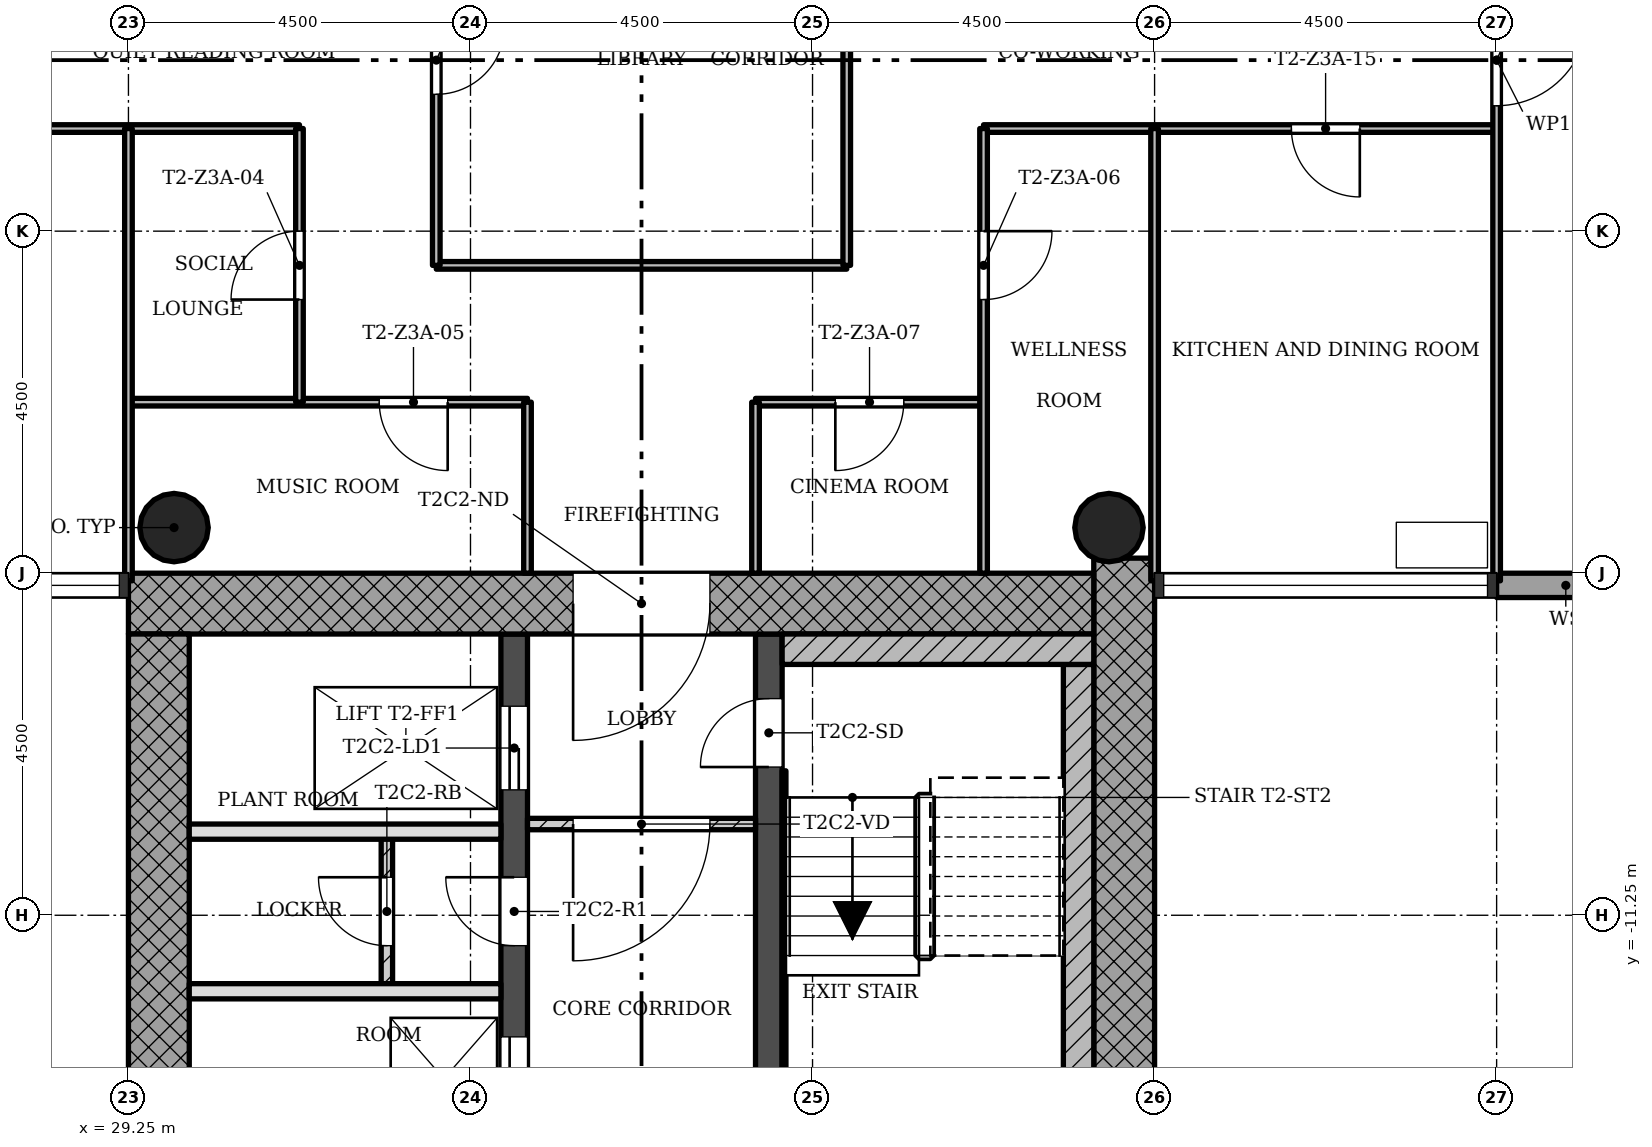
"""IFC4 building model, lengths in metres.
Left out: names, types, materials, properties, quantities, classifications, styles, units other than length and angle.
Written with IfcOpenShell. Run it as: python <this file> out.ifc"""

import sys

from ifc_helpers import new_model, si_unit, direction, frame, frame_2d, origin, origin_2d, place, context, subcontext, project, spatial, rectangle, hollow_circle, extrude, element, fill, save


model = new_model("IFC4")
c1 = context("Model", 3, precision=1e-05, world=origin(), true_north=direction((0.0, 1.0)))
c2 = subcontext(c1, "Body", "Model", "MODEL_VIEW")
j1 = project(units=[si_unit("LENGTHUNIT", "METRE"), si_unit("PLANEANGLEUNIT", "RADIAN")], contexts=[c1])
p1 = place(None, origin())
s1 = spatial("IfcSite", under=j1, at=p1, CompositionType="ELEMENT")
p2 = place(p1, origin())
s2 = spatial("IfcBuilding", under=s1, at=p2, CompositionType="ELEMENT")
p3 = place(p2, frame((0.0, 0.0, 140.5)))
s3 = spatial("IfcBuildingStorey", under=s2, at=p3, CompositionType="ELEMENT", Elevation=140.5)
p4 = place(p3, frame((42.35, -14.95, 0.0), z_axis=(0.0, 0.0, 1.0), x_axis=(0.0, 1.0, 0.0)))
e1 = element("IfcWall", 1, at=p4, inside=s3, PredefinedType="SHEAR", context=c2, shape_type="SweptSolid", body=[
    extrude(rectangle(XDim=8.398, YDim=0.8, at=frame_2d((4.199, 0.0))), origin(), (0.0, 0.0, 1.0), 3.4),
])
p5 = place(p3, frame((41.95, -7.15, 0.0), z_axis=(0.0, 0.0, 1.0), x_axis=(-1.0, 0.0, 0.0)))
e2 = element("IfcWall", 2, at=p5, inside=s3, PredefinedType="SHEAR", context=c2, shape_type="SweptSolid", body=[
    extrude(rectangle(XDim=12.7, YDim=0.8, at=frame_2d((6.35, 0.0))), origin(), (0.0, 0.0, 1.0), 3.4),
])
p6 = place(p5, frame((5.05, 0.0, 0.0)))
e3 = element("IfcOpeningElement", 3, at=p6, cuts=e2, PredefinedType="OPENING", context=c2, shape_type="SweptSolid", body=[
    extrude(rectangle(XDim=1.8, YDim=2.1, at=frame_2d((0.9, 1.05))), frame((0.0, 0.41, 0.0), z_axis=(0.0, -1.0, 0.0), x_axis=(1.0, 0.0, 0.0)), (0.0, 0.0, 1.0), 0.82),
])
p7 = place(p3, frame((29.65, -7.55, 0.0), z_axis=(0.0, 0.0, 1.0), x_axis=(0.0, -1.0, 0.0)))
e4 = element("IfcWall", 4, at=p7, inside=s3, PredefinedType="SHEAR", context=c2, shape_type="SweptSolid", body=[
    extrude(rectangle(XDim=8.2, YDim=0.8, at=frame_2d((4.1, 0.0))), origin(), (0.0, 0.0, 1.0), 3.4),
])
p8 = place(p3, frame((34.325, -14.95, 0.0), z_axis=(0.0, 0.0, 1.0), x_axis=(0.0, 1.0, 0.0)))
e5 = element("IfcWall", 5, at=p8, inside=s3, PredefinedType="SHEAR", context=c2, shape_type="SweptSolid", body=[
    extrude(rectangle(XDim=7.4, YDim=0.35, at=frame_2d((3.7, 0.0))), origin(), (0.0, 0.0, 1.0), 3.4),
])
p9 = place(p8, frame((5.35, 0.0, 0.0)))
e6 = element("IfcOpeningElement", 6, at=p9, cuts=e5, PredefinedType="OPENING", context=c2, shape_type="SweptSolid", body=[
    extrude(rectangle(XDim=1.1, YDim=2.1, at=frame_2d((0.55, 1.05))), frame((0.0, 0.185, 0.0), z_axis=(0.0, -1.0, 0.0), x_axis=(1.0, 0.0, 0.0)), (0.0, 0.0, 1.0), 0.37),
])
p10 = place(p8, frame((1.0, 0.0, 0.0)))
e7 = element("IfcOpeningElement", 7, at=p10, cuts=e5, PredefinedType="OPENING", context=c2, shape_type="SweptSolid", body=[
    extrude(rectangle(XDim=1.1, YDim=2.1, at=frame_2d((0.55, 1.05))), frame((0.0, 0.185, 0.0), z_axis=(0.0, -1.0, 0.0), x_axis=(1.0, 0.0, 0.0)), (0.0, 0.0, 1.0), 0.37),
])
p11 = place(p8, frame((3.3, 0.0, 0.0)))
e8 = element("IfcOpeningElement", 8, at=p11, cuts=e5, PredefinedType="OPENING", context=c2, shape_type="SweptSolid", body=[
    extrude(rectangle(XDim=0.9, YDim=2.1, at=frame_2d((0.45, 1.05))), frame((0.0, 0.185, 0.0), z_axis=(0.0, -1.0, 0.0), x_axis=(1.0, 0.0, 0.0)), (0.0, 0.0, 1.0), 0.37),
])
p12 = place(p3, frame((37.675, -14.95, 0.0), z_axis=(0.0, 0.0, 1.0), x_axis=(0.0, 1.0, 0.0)))
e9 = element("IfcWall", 9, at=p12, inside=s3, PredefinedType="SHEAR", context=c2, shape_type="SweptSolid", body=[
    extrude(rectangle(XDim=7.4, YDim=0.35, at=frame_2d((3.7, 0.0))), origin(), (0.0, 0.0, 1.0), 3.4),
])
p13 = place(p12, frame((5.65, 0.0, 0.0)))
e10 = element("IfcOpeningElement", 10, at=p13, cuts=e9, PredefinedType="OPENING", context=c2, shape_type="SweptSolid", body=[
    extrude(rectangle(XDim=0.9, YDim=2.1, at=frame_2d((0.45, 1.05))), frame((0.0, 0.185, 0.0), z_axis=(0.0, -1.0, 0.0), x_axis=(1.0, 0.0, 0.0)), (0.0, 0.0, 1.0), 0.37),
])
for number, where, z_axis, x_axis in (
    (11, (42.15, -6.15, 0.0), (0.0, 0.0, 1.0), (1.0, 0.0, 0.0)),
    (12, (29.85, -6.15, 0.0), (0.0, 0.0, 1.0), (1.0, 0.0, 0.0)),
):
    element("IfcColumn", number, at=place(p3, frame(where, z_axis=z_axis, x_axis=x_axis)), inside=s3, PredefinedType="COLUMN", context=c2, shape_type="SweptSolid", body=[
        extrude(hollow_circle(Radius=0.45, WallThickness=0.032, at=origin_2d()), origin(), (0.0, 0.0, 1.0), 3.4),
    ])
p14 = place(p3, frame((47.25, -6.91, -0.3), z_axis=(0.0, 0.0, 1.0), x_axis=(1.0, 0.0, 0.0)))
e13 = element("IfcWall", 13, at=p14, inside=s3, PredefinedType="STANDARD", context=c2, shape_type="SweptSolid", body=[
    extrude(rectangle(XDim=1.82, YDim=0.32, at=frame_2d((0.91, 0.0))), origin(), (0.0, 0.0, 1.0), 3.4),
])
p15 = place(p3, frame((34.5, -10.05, 0.0), z_axis=(0.0, 0.0, 1.0), x_axis=(1.0, 0.0, 0.0)))
e14 = element("IfcWall", 14, at=p15, inside=s3, PredefinedType="PARTITIONING", context=c2, shape_type="SweptSolid", body=[
    extrude(rectangle(XDim=3.0, YDim=0.15, at=frame_2d((1.5, 0.0))), origin(), (0.0, 0.0, 1.0), 3.0),
])
p16 = place(p15, frame((0.6, 0.0, 0.0)))
e15 = element("IfcOpeningElement", 15, at=p16, cuts=e14, PredefinedType="OPENING", context=c2, shape_type="SweptSolid", body=[
    extrude(rectangle(XDim=1.8, YDim=2.1, at=frame_2d((0.9, 1.05))), frame((0.0, 0.085, 0.0), z_axis=(0.0, -1.0, 0.0), x_axis=(1.0, 0.0, 0.0)), (0.0, 0.0, 1.0), 0.17),
])
for number, where, z_axis, x_axis in (
    (16, (30.05, -12.25, 0.0), (0.0, 0.0, 1.0), (1.0, 0.0, 0.0)),
    (17, (30.05, -10.15, 0.0), (0.0, 0.0, 1.0), (1.0, 0.0, 0.0)),
):
    element("IfcWall", number, at=place(p3, frame(where, z_axis=z_axis, x_axis=x_axis)), inside=s3, PredefinedType="SOLIDWALL", context=c2, shape_type="SweptSolid", body=[
        extrude(rectangle(XDim=4.1, YDim=0.2, at=frame_2d((2.05, 0.0))), origin(), (0.0, 0.0, 1.0), 3.0),
    ])
p17 = place(p3, frame((32.65, -10.15, 0.0), z_axis=(0.0, 0.0, 1.0), x_axis=(0.0, -1.0, 0.0)))
e18 = element("IfcWall", 18, at=p17, inside=s3, PredefinedType="PARTITIONING", context=c2, shape_type="SweptSolid", body=[
    extrude(rectangle(XDim=2.1, YDim=0.15, at=frame_2d((1.05, 0.0))), origin(), (0.0, 0.0, 1.0), 3.0),
])
p18 = place(p17, frame((0.6, 0.0, 0.0)))
e19 = element("IfcOpeningElement", 19, at=p18, cuts=e18, PredefinedType="OPENING", context=c2, shape_type="SweptSolid", body=[
    extrude(rectangle(XDim=0.9, YDim=2.1, at=frame_2d((0.45, 1.05))), frame((0.0, 0.085, 0.0), z_axis=(0.0, -1.0, 0.0), x_axis=(1.0, 0.0, 0.0)), (0.0, 0.0, 1.0), 0.17),
])
p19 = place(p3, frame((40.5, -4.5, 0.0), z_axis=(0.0, 0.0, 1.0), x_axis=(-1.0, 0.0, 0.0)))
e20 = element("IfcWall", 20, at=p19, inside=s3, PredefinedType="PARTITIONING", context=c2, shape_type="SweptSolid", body=[
    extrude(rectangle(XDim=3.0, YDim=0.1, at=frame_2d((1.5, 0.0))), origin(), (0.0, 0.0, 1.0), 3.0),
])
p20 = place(p19, frame((1.05, 0.0, 0.0)))
e21 = element("IfcOpeningElement", 21, at=p20, cuts=e20, PredefinedType="OPENING", context=c2, shape_type="SweptSolid", body=[
    extrude(rectangle(XDim=0.9, YDim=2.1, at=frame_2d((0.45, 1.05))), frame((0.0, 0.06, 0.0), z_axis=(0.0, -1.0, 0.0), x_axis=(1.0, 0.0, 0.0)), (0.0, 0.0, 1.0), 0.12),
])
p21 = place(p3, frame((34.5, -4.5, 0.0), z_axis=(0.0, 0.0, 1.0), x_axis=(-1.0, 0.0, 0.0)))
e22 = element("IfcWall", 22, at=p21, inside=s3, PredefinedType="PARTITIONING", context=c2, shape_type="SweptSolid", body=[
    extrude(rectangle(XDim=5.25, YDim=0.1, at=frame_2d((2.625, 0.0))), origin(), (0.0, 0.0, 1.0), 3.0),
])
p22 = place(p21, frame((1.05, 0.0, 0.0)))
e23 = element("IfcOpeningElement", 23, at=p22, cuts=e22, PredefinedType="OPENING", context=c2, shape_type="SweptSolid", body=[
    extrude(rectangle(XDim=0.9, YDim=2.1, at=frame_2d((0.45, 1.05))), frame((0.0, 0.06, 0.0), z_axis=(0.0, -1.0, 0.0), x_axis=(1.0, 0.0, 0.0)), (0.0, 0.0, 1.0), 0.12),
])
p23 = place(p3, frame((38.7, -2.7, 0.0), z_axis=(0.0, 0.0, 1.0), x_axis=(-1.0, 0.0, 0.0)))
e24 = element("IfcWall", 24, at=p23, inside=s3, PredefinedType="PARTITIONING", context=c2, shape_type="SweptSolid", body=[
    extrude(rectangle(XDim=5.4, YDim=0.1, at=frame_2d((2.7, 0.0))), origin(), (0.0, 0.0, 1.0), 3.0),
])
p24 = place(p3, frame((47.25, -0.9, 0.0), z_axis=(0.0, 0.0, 1.0), x_axis=(-1.0, 0.0, 0.0)))
e25 = element("IfcWall", 25, at=p24, inside=s3, PredefinedType="PARTITIONING", context=c2, shape_type="SweptSolid", body=[
    extrude(rectangle(XDim=6.75, YDim=0.1, at=frame_2d((3.375, 0.0))), origin(), (0.0, 0.0, 1.0), 3.0),
])
p25 = place(p24, frame((1.8, 0.0, 0.0)))
e26 = element("IfcOpeningElement", 26, at=p25, cuts=e25, PredefinedType="OPENING", context=c2, shape_type="SweptSolid", body=[
    extrude(rectangle(XDim=0.9, YDim=2.1, at=frame_2d((0.45, 1.05))), frame((0.0, 0.06, 0.0), z_axis=(0.0, -1.0, 0.0), x_axis=(1.0, 0.0, 0.0)), (0.0, 0.0, 1.0), 0.12),
])
p26 = place(p3, frame((31.5, -0.9, 0.0), z_axis=(0.0, 0.0, 1.0), x_axis=(-1.0, 0.0, 0.0)))
e27 = element("IfcWall", 27, at=p26, inside=s3, PredefinedType="PARTITIONING", context=c2, shape_type="SweptSolid", body=[
    extrude(rectangle(XDim=4.05, YDim=0.1, at=frame_2d((2.025, 0.0))), origin(), (0.0, 0.0, 1.0), 3.0),
])
p27 = place(p3, frame((47.25, -6.85, 0.0), z_axis=(0.0, 0.0, 1.0), x_axis=(0.0, 1.0, 0.0)))
e28 = element("IfcWall", 28, at=p27, inside=s3, PredefinedType="PARTITIONING", context=c2, shape_type="SweptSolid", body=[
    extrude(rectangle(XDim=13.7, YDim=0.1, at=frame_2d((6.85, 0.0))), origin(), (0.0, 0.0, 1.0), 3.0),
])
p28 = place(p27, frame((6.25, 0.0, 0.0)))
e29 = element("IfcOpeningElement", 29, at=p28, cuts=e28, PredefinedType="OPENING", context=c2, shape_type="SweptSolid", body=[
    extrude(rectangle(XDim=1.2, YDim=2.1, at=frame_2d((0.6, 1.05))), frame((0.0, 0.06, 0.0), z_axis=(0.0, -1.0, 0.0), x_axis=(1.0, 0.0, 0.0)), (0.0, 0.0, 1.0), 0.12),
])
p29 = place(p3, frame((42.75, -6.85, 0.0), z_axis=(0.0, 0.0, 1.0), x_axis=(0.0, 1.0, 0.0)))
e30 = element("IfcWall", 30, at=p29, inside=s3, PredefinedType="PARTITIONING", context=c2, shape_type="SweptSolid", body=[
    extrude(rectangle(XDim=5.95, YDim=0.1, at=frame_2d((2.975, 0.0))), origin(), (0.0, 0.0, 1.0), 3.0),
])
p30 = place(p3, frame((40.5, -6.75, 0.0), z_axis=(0.0, 0.0, 1.0), x_axis=(0.0, 1.0, 0.0)))
e31 = element("IfcWall", 31, at=p30, inside=s3, PredefinedType="PARTITIONING", context=c2, shape_type="SweptSolid", body=[
    extrude(rectangle(XDim=5.85, YDim=0.1, at=frame_2d((2.925, 0.0))), origin(), (0.0, 0.0, 1.0), 3.0),
])
p31 = place(p30, frame((3.6, 0.0, 0.0)))
e32 = element("IfcOpeningElement", 32, at=p31, cuts=e31, PredefinedType="OPENING", context=c2, shape_type="SweptSolid", body=[
    extrude(rectangle(XDim=0.9, YDim=2.1, at=frame_2d((0.45, 1.05))), frame((0.0, 0.06, 0.0), z_axis=(0.0, -1.0, 0.0), x_axis=(1.0, 0.0, 0.0)), (0.0, 0.0, 1.0), 0.12),
])
p32 = place(p3, frame((38.7, -2.7, 0.0), z_axis=(0.0, 0.0, 1.0), x_axis=(0.0, 1.0, 0.0)))
e33 = element("IfcWall", 33, at=p32, inside=s3, PredefinedType="PARTITIONING", context=c2, shape_type="SweptSolid", body=[
    extrude(rectangle(XDim=5.4, YDim=0.1, at=frame_2d((2.7, 0.0))), origin(), (0.0, 0.0, 1.0), 3.0),
])
for number, where, z_axis, x_axis in (
    (34, (37.5, -6.75, 0.0), (0.0, 0.0, 1.0), (0.0, 1.0, 0.0)),
    (35, (34.5, -6.75, 0.0), (0.0, 0.0, 1.0), (0.0, 1.0, 0.0)),
):
    element("IfcWall", number, at=place(p3, frame(where, z_axis=z_axis, x_axis=x_axis)), inside=s3, PredefinedType="PARTITIONING", context=c2, shape_type="SweptSolid", body=[
        extrude(rectangle(XDim=2.25, YDim=0.1, at=frame_2d((1.125, 0.0))), origin(), (0.0, 0.0, 1.0), 3.0),
    ])
p33 = place(p3, frame((33.3, -2.7, 0.0), z_axis=(0.0, 0.0, 1.0), x_axis=(0.0, 1.0, 0.0)))
e36 = element("IfcWall", 36, at=p33, inside=s3, PredefinedType="PARTITIONING", context=c2, shape_type="SweptSolid", body=[
    extrude(rectangle(XDim=5.4, YDim=0.1, at=frame_2d((2.7, 0.0))), origin(), (0.0, 0.0, 1.0), 3.0),
])
p34 = place(p33, frame((2.25, 0.0, 0.0)))
e37 = element("IfcOpeningElement", 37, at=p34, cuts=e36, PredefinedType="OPENING", context=c2, shape_type="SweptSolid", body=[
    extrude(rectangle(XDim=0.9, YDim=2.1, at=frame_2d((0.45, 1.05))), frame((0.0, 0.06, 0.0), z_axis=(0.0, -1.0, 0.0), x_axis=(1.0, 0.0, 0.0)), (0.0, 0.0, 1.0), 0.12),
])
p35 = place(p3, frame((31.5, -4.5, 0.0), z_axis=(0.0, 0.0, 1.0), x_axis=(0.0, 1.0, 0.0)))
e38 = element("IfcWall", 38, at=p35, inside=s3, PredefinedType="PARTITIONING", context=c2, shape_type="SweptSolid", body=[
    extrude(rectangle(XDim=3.6, YDim=0.1, at=frame_2d((1.8, 0.0))), origin(), (0.0, 0.0, 1.0), 3.0),
])
p36 = place(p35, frame((1.35, 0.0, 0.0)))
e39 = element("IfcOpeningElement", 39, at=p36, cuts=e38, PredefinedType="OPENING", context=c2, shape_type="SweptSolid", body=[
    extrude(rectangle(XDim=0.9, YDim=2.1, at=frame_2d((0.45, 1.05))), frame((0.0, 0.06, 0.0), z_axis=(0.0, -1.0, 0.0), x_axis=(1.0, 0.0, 0.0)), (0.0, 0.0, 1.0), 0.12),
])
p37 = place(p3, frame((29.25, -6.85, 0.0), z_axis=(0.0, 0.0, 1.0), x_axis=(0.0, 1.0, 0.0)))
e40 = element("IfcWall", 40, at=p37, inside=s3, PredefinedType="PARTITIONING", context=c2, shape_type="SweptSolid", body=[
    extrude(rectangle(XDim=5.95, YDim=0.1, at=frame_2d((2.975, 0.0))), origin(), (0.0, 0.0, 1.0), 3.0),
])
p38 = place(p3, frame((41.75, -7.95, 0.0), z_axis=(0.0, 0.0, 1.0), x_axis=(0.0, -1.0, 0.0)))
e41 = element("IfcWall", 41, at=p38, inside=s3, PredefinedType="SHEAR", context=c2, shape_type="SweptSolid", body=[
    extrude(rectangle(XDim=6.6, YDim=0.4, at=frame_2d((3.3, 0.0))), origin(), (0.0, 0.0, 1.0), 3.4),
])
p39 = place(p3, frame((37.85, -7.75, 0.0), z_axis=(0.0, 0.0, 1.0), x_axis=(1.0, 0.0, 0.0)))
e42 = element("IfcWall", 42, at=p39, inside=s3, PredefinedType="SHEAR", context=c2, shape_type="SweptSolid", body=[
    extrude(rectangle(XDim=4.1, YDim=0.4, at=frame_2d((2.05, 0.0))), origin(), (0.0, 0.0, 1.0), 3.4),
])
p40 = place(p3, frame((37.875, -9.35, 0.0), z_axis=(0.0, 0.0, 1.0), x_axis=(0.0, -1.0, 0.0)))
e43 = element("IfcWall", 43, at=p40, inside=s3, PredefinedType="SHEAR", context=c2, shape_type="SweptSolid", body=[
    extrude(rectangle(XDim=5.2, YDim=0.05, at=frame_2d((2.6, 0.0))), origin(), (0.0, 0.0, 1.0), 3.4),
])
p41 = place(p16, origin())
e44 = element("IfcDoor", 44, at=p41, inside=s3, OperationType="SINGLE_SWING_LEFT", PredefinedType="DOOR", context=c2, shape_type="SweptSolid", body=[
    extrude(rectangle(XDim=1.8, YDim=2.1, at=frame_2d((0.9, 1.05))), frame((0.0, 0.025, 0.0), z_axis=(0.0, -1.0, 0.0), x_axis=(1.0, 0.0, 0.0)), (0.0, 0.0, 1.0), 0.05),
])
fill(e15, e44)
p42 = place(p18, origin())
e45 = element("IfcDoor", 45, at=p42, inside=s3, OperationType="SINGLE_SWING_LEFT", PredefinedType="DOOR", context=c2, shape_type="SweptSolid", body=[
    extrude(rectangle(XDim=0.9, YDim=2.1, at=frame_2d((0.45, 1.05))), frame((0.0, 0.025, 0.0), z_axis=(0.0, -1.0, 0.0), x_axis=(1.0, 0.0, 0.0)), (0.0, 0.0, 1.0), 0.05),
])
fill(e19, e45)
p43 = place(p34, origin())
e46 = element("IfcDoor", 46, at=p43, inside=s3, OperationType="SINGLE_SWING_RIGHT", PredefinedType="DOOR", context=c2, shape_type="SweptSolid", body=[
    extrude(rectangle(XDim=0.9, YDim=2.1, at=frame_2d((0.45, 1.05))), frame((0.0, 0.025, 0.0), z_axis=(0.0, -1.0, 0.0), x_axis=(1.0, 0.0, 0.0)), (0.0, 0.0, 1.0), 0.05),
])
fill(e37, e46)
p44 = place(p36, origin())
e47 = element("IfcDoor", 47, at=p44, inside=s3, OperationType="SINGLE_SWING_RIGHT", PredefinedType="DOOR", context=c2, shape_type="SweptSolid", body=[
    extrude(rectangle(XDim=0.9, YDim=2.1, at=frame_2d((0.45, 1.05))), frame((0.0, 0.025, 0.0), z_axis=(0.0, -1.0, 0.0), x_axis=(1.0, 0.0, 0.0)), (0.0, 0.0, 1.0), 0.05),
])
fill(e39, e47)
p45 = place(p22, origin())
e48 = element("IfcDoor", 48, at=p45, inside=s3, OperationType="SINGLE_SWING_RIGHT", PredefinedType="DOOR", context=c2, shape_type="SweptSolid", body=[
    extrude(rectangle(XDim=0.9, YDim=2.1, at=frame_2d((0.45, 1.05))), frame((0.0, 0.025, 0.0), z_axis=(0.0, -1.0, 0.0), x_axis=(1.0, 0.0, 0.0)), (0.0, 0.0, 1.0), 0.05),
])
fill(e23, e48)
p46 = place(p31, origin())
e49 = element("IfcDoor", 49, at=p46, inside=s3, OperationType="SINGLE_SWING_RIGHT", PredefinedType="DOOR", context=c2, shape_type="SweptSolid", body=[
    extrude(rectangle(XDim=0.9, YDim=2.1, at=frame_2d((0.45, 1.05))), frame((0.0, 0.025, 0.0), z_axis=(0.0, -1.0, 0.0), x_axis=(1.0, 0.0, 0.0)), (0.0, 0.0, 1.0), 0.05),
])
fill(e32, e49)
p47 = place(p20, origin())
e50 = element("IfcDoor", 50, at=p47, inside=s3, OperationType="SINGLE_SWING_LEFT", PredefinedType="DOOR", context=c2, shape_type="SweptSolid", body=[
    extrude(rectangle(XDim=0.9, YDim=2.1, at=frame_2d((0.45, 1.05))), frame((0.0, 0.025, 0.0), z_axis=(0.0, -1.0, 0.0), x_axis=(1.0, 0.0, 0.0)), (0.0, 0.0, 1.0), 0.05),
])
fill(e21, e50)
p48 = place(p25, origin())
e51 = element("IfcDoor", 51, at=p48, inside=s3, OperationType="SINGLE_SWING_RIGHT", PredefinedType="DOOR", context=c2, shape_type="SweptSolid", body=[
    extrude(rectangle(XDim=0.9, YDim=2.1, at=frame_2d((0.45, 1.05))), frame((0.0, 0.025, 0.0), z_axis=(0.0, -1.0, 0.0), x_axis=(1.0, 0.0, 0.0)), (0.0, 0.0, 1.0), 0.05),
])
fill(e26, e51)
p49 = place(p28, origin())
e52 = element("IfcDoor", 52, at=p49, inside=s3, OperationType="SINGLE_SWING_RIGHT", PredefinedType="DOOR", context=c2, shape_type="SweptSolid", body=[
    extrude(rectangle(XDim=1.2, YDim=2.1, at=frame_2d((0.6, 1.05))), frame((0.0, 0.025, 0.0), z_axis=(0.0, -1.0, 0.0), x_axis=(1.0, 0.0, 0.0)), (0.0, 0.0, 1.0), 0.05),
])
fill(e29, e52)
p50 = place(p13, origin())
e53 = element("IfcDoor", 53, at=p50, inside=s3, OperationType="SINGLE_SWING_RIGHT", PredefinedType="DOOR", context=c2, shape_type="SweptSolid", body=[
    extrude(rectangle(XDim=0.9, YDim=2.1, at=frame_2d((0.45, 1.05))), frame((0.0, 0.025, 0.0), z_axis=(0.0, -1.0, 0.0), x_axis=(1.0, 0.0, 0.0)), (0.0, 0.0, 1.0), 0.05),
])
fill(e10, e53)
p51 = place(p9, origin())
e54 = element("IfcDoor", 54, at=p51, inside=s3, OperationType="SLIDING_TO_LEFT", PredefinedType="DOOR", context=c2, shape_type="SweptSolid", body=[
    extrude(rectangle(XDim=1.1, YDim=2.1, at=frame_2d((0.55, 1.05))), frame((0.0, 0.025, 0.0), z_axis=(0.0, -1.0, 0.0), x_axis=(1.0, 0.0, 0.0)), (0.0, 0.0, 1.0), 0.05),
])
fill(e6, e54)
p52 = place(p10, origin())
e55 = element("IfcDoor", 55, at=p52, inside=s3, OperationType="SLIDING_TO_LEFT", PredefinedType="DOOR", context=c2, shape_type="SweptSolid", body=[
    extrude(rectangle(XDim=1.1, YDim=2.1, at=frame_2d((0.55, 1.05))), frame((0.0, 0.025, 0.0), z_axis=(0.0, -1.0, 0.0), x_axis=(1.0, 0.0, 0.0)), (0.0, 0.0, 1.0), 0.05),
])
fill(e7, e55)
p53 = place(p11, origin())
e56 = element("IfcDoor", 56, at=p53, inside=s3, OperationType="SINGLE_SWING_LEFT", PredefinedType="DOOR", context=c2, shape_type="SweptSolid", body=[
    extrude(rectangle(XDim=0.9, YDim=2.1, at=frame_2d((0.45, 1.05))), frame((0.0, 0.025, 0.0), z_axis=(0.0, -1.0, 0.0), x_axis=(1.0, 0.0, 0.0)), (0.0, 0.0, 1.0), 0.05),
])
fill(e8, e56)
p54 = place(p6, origin())
e57 = element("IfcDoor", 57, at=p54, inside=s3, OperationType="SINGLE_SWING_LEFT", PredefinedType="DOOR", context=c2, shape_type="SweptSolid", body=[
    extrude(rectangle(XDim=1.8, YDim=2.1, at=frame_2d((0.9, 1.05))), frame((0.0, 0.025, 0.0), z_axis=(0.0, -1.0, 0.0), x_axis=(1.0, 0.0, 0.0)), (0.0, 0.0, 1.0), 0.05),
])
fill(e3, e57)
save(model, sys.argv[1])
